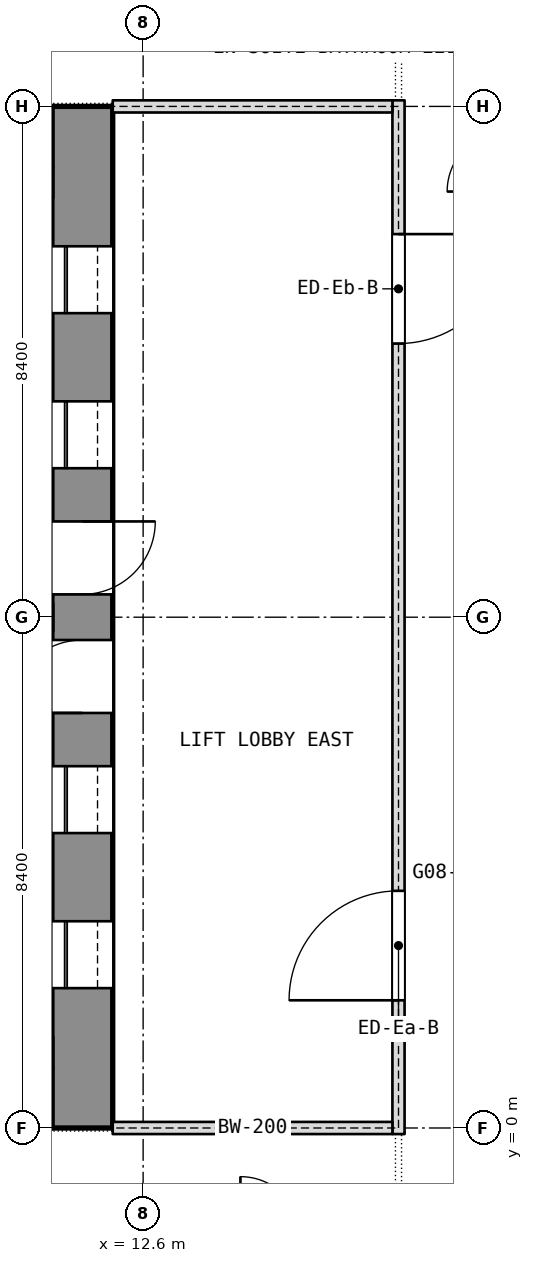
"""IFC4 building model, lengths in metres.
Left out: names, types, materials, properties, quantities, classifications, styles, units other than length and angle.
Written with IfcOpenShell. Run it as: python <this file> out.ifc"""

import sys

from ifc_helpers import new_model, si_unit, direction, frame, frame_2d, origin, place, context, subcontext, project, spatial, rectangle, extrude, element, fill, save


model = new_model("IFC4")
c1 = context("Model", 3, precision=1e-05, world=origin(), true_north=direction((0.0, 1.0)))
c2 = subcontext(c1, "Body", "Model", "MODEL_VIEW")
j1 = project(units=[si_unit("LENGTHUNIT", "METRE"), si_unit("PLANEANGLEUNIT", "RADIAN")], contexts=[c1])
p1 = place(None, origin())
s1 = spatial("IfcSite", under=j1, at=p1, CompositionType="ELEMENT")
p2 = place(p1, origin())
s2 = spatial("IfcBuilding", under=s1, at=p2, CompositionType="ELEMENT")
p3 = place(p2, frame((0.0, 0.0, 104.9)))
s3 = spatial("IfcBuildingStorey", under=s2, at=p3, CompositionType="ELEMENT", Elevation=104.9)
p4 = place(p3, frame((11.6, 0.0, 0.0), z_axis=(0.0, 0.0, 1.0), x_axis=(0.0, 1.0, 0.0)))
e1 = element("IfcWall", 1, at=p4, inside=s3, PredefinedType="SHEAR", context=c2, shape_type="SweptSolid", body=[
    extrude(rectangle(XDim=16.8, YDim=1.0, at=frame_2d((8.4, 0.0))), origin(), (0.0, 0.0, 1.0), 3.6),
])
p5 = place(p4, frame((2.3, 0.0, 0.0)))
e2 = element("IfcOpeningElement", 2, at=p5, cuts=e1, PredefinedType="OPENING", context=c2, shape_type="SweptSolid", body=[
    extrude(rectangle(XDim=1.1, YDim=2.1, at=frame_2d((0.55, 1.05))), frame((0.0, 0.5, 0.0), z_axis=(0.0, -1.0, 0.0), x_axis=(1.0, 0.0, 0.0)), (0.0, 0.0, 1.0), 1.0),
])
p6 = place(p4, frame((4.85, 0.0, 0.0)))
e3 = element("IfcOpeningElement", 3, at=p6, cuts=e1, PredefinedType="OPENING", context=c2, shape_type="SweptSolid", body=[
    extrude(rectangle(XDim=1.1, YDim=2.1, at=frame_2d((0.55, 1.05))), frame((0.0, 0.5, 0.0), z_axis=(0.0, -1.0, 0.0), x_axis=(1.0, 0.0, 0.0)), (0.0, 0.0, 1.0), 1.0),
])
p7 = place(p4, frame((6.825, 0.0, 0.0)))
e4 = element("IfcOpeningElement", 4, at=p7, cuts=e1, PredefinedType="OPENING", context=c2, shape_type="SweptSolid", body=[
    extrude(rectangle(XDim=1.2, YDim=2.1, at=frame_2d((0.6, 1.05))), frame((0.0, 0.5, 0.0), z_axis=(0.0, -1.0, 0.0), x_axis=(1.0, 0.0, 0.0)), (0.0, 0.0, 1.0), 1.0),
])
p8 = place(p4, frame((13.4, 0.0, 0.0)))
e5 = element("IfcOpeningElement", 5, at=p8, cuts=e1, PredefinedType="OPENING", context=c2, shape_type="SweptSolid", body=[
    extrude(rectangle(XDim=1.1, YDim=2.1, at=frame_2d((0.55, 1.05))), frame((0.0, 0.5, 0.0), z_axis=(0.0, -1.0, 0.0), x_axis=(1.0, 0.0, 0.0)), (0.0, 0.0, 1.0), 1.0),
])
p9 = place(p4, frame((10.85, 0.0, 0.0)))
e6 = element("IfcOpeningElement", 6, at=p9, cuts=e1, PredefinedType="OPENING", context=c2, shape_type="SweptSolid", body=[
    extrude(rectangle(XDim=1.1, YDim=2.1, at=frame_2d((0.55, 1.05))), frame((0.0, 0.5, 0.0), z_axis=(0.0, -1.0, 0.0), x_axis=(1.0, 0.0, 0.0)), (0.0, 0.0, 1.0), 1.0),
])
p10 = place(p4, frame((8.775, 0.0, 0.0)))
e7 = element("IfcOpeningElement", 7, at=p10, cuts=e1, PredefinedType="OPENING", context=c2, shape_type="SweptSolid", body=[
    extrude(rectangle(XDim=1.2, YDim=2.1, at=frame_2d((0.6, 1.05))), frame((0.0, 0.5, 0.0), z_axis=(0.0, -1.0, 0.0), x_axis=(1.0, 0.0, 0.0)), (0.0, 0.0, 1.0), 1.0),
])
p11 = place(p3, frame((16.8, -0.1, 0.0), z_axis=(0.0, 0.0, 1.0), x_axis=(0.0, 1.0, 0.0)))
e8 = element("IfcWall", 8, at=p11, inside=s3, PredefinedType="PARTITIONING", context=c2, shape_type="SweptSolid", body=[
    extrude(rectangle(XDim=17.0, YDim=0.2, at=frame_2d((8.5, 0.0))), origin(), (0.0, 0.0, 1.0), 3.34),
])
p12 = place(p11, frame((2.2, 0.0, 0.0)))
e9 = element("IfcOpeningElement", 9, at=p12, cuts=e8, PredefinedType="OPENING", context=c2, shape_type="SweptSolid", body=[
    extrude(rectangle(XDim=1.8, YDim=2.1, at=frame_2d((0.9, 1.05))), frame((0.0, 0.1, 0.0), z_axis=(0.0, -1.0, 0.0), x_axis=(1.0, 0.0, 0.0)), (0.0, 0.0, 1.0), 0.2),
])
p13 = place(p11, frame((13.0, 0.0, 0.0)))
e10 = element("IfcOpeningElement", 10, at=p13, cuts=e8, PredefinedType="OPENING", context=c2, shape_type="SweptSolid", body=[
    extrude(rectangle(XDim=1.8, YDim=2.1, at=frame_2d((0.9, 1.05))), frame((0.0, 0.1, 0.0), z_axis=(0.0, -1.0, 0.0), x_axis=(1.0, 0.0, 0.0)), (0.0, 0.0, 1.0), 0.2),
])
for number, where, z_axis, x_axis in (
    (11, (12.1, 0.0, 0.0), (0.0, 0.0, 1.0), (1.0, 0.0, 0.0)),
    (12, (12.1, 16.8, 0.0), (0.0, 0.0, 1.0), (1.0, 0.0, 0.0)),
):
    element("IfcWall", number, at=place(p3, frame(where, z_axis=z_axis, x_axis=x_axis)), inside=s3, PredefinedType="PARTITIONING", context=c2, shape_type="SweptSolid", body=[
        extrude(rectangle(XDim=4.6, YDim=0.2, at=frame_2d((2.3, 0.0))), origin(), (0.0, 0.0, 1.0), 2.89),
    ])
p14 = place(p5, origin())
e13 = element("IfcDoor", 13, at=p14, inside=s3, OperationType="SLIDING_TO_LEFT", PredefinedType="DOOR", context=c2, shape_type="SweptSolid", body=[
    extrude(rectangle(XDim=1.1, YDim=2.1, at=frame_2d((0.55, 1.05))), frame((0.0, 0.025, 0.0), z_axis=(0.0, -1.0, 0.0), x_axis=(1.0, 0.0, 0.0)), (0.0, 0.0, 1.0), 0.05),
])
fill(e2, e13)
p15 = place(p6, origin())
e14 = element("IfcDoor", 14, at=p15, inside=s3, OperationType="SLIDING_TO_LEFT", PredefinedType="DOOR", context=c2, shape_type="SweptSolid", body=[
    extrude(rectangle(XDim=1.1, YDim=2.1, at=frame_2d((0.55, 1.05))), frame((0.0, 0.025, 0.0), z_axis=(0.0, -1.0, 0.0), x_axis=(1.0, 0.0, 0.0)), (0.0, 0.0, 1.0), 0.05),
])
fill(e3, e14)
p16 = place(p7, origin())
e15 = element("IfcDoor", 15, at=p16, inside=s3, OperationType="SINGLE_SWING_LEFT", PredefinedType="DOOR", context=c2, shape_type="SweptSolid", body=[
    extrude(rectangle(XDim=1.2, YDim=2.1, at=frame_2d((0.6, 1.05))), frame((0.0, 0.025, 0.0), z_axis=(0.0, -1.0, 0.0), x_axis=(1.0, 0.0, 0.0)), (0.0, 0.0, 1.0), 0.05),
])
fill(e4, e15)
p17 = place(p8, origin())
e16 = element("IfcDoor", 16, at=p17, inside=s3, OperationType="SLIDING_TO_LEFT", PredefinedType="DOOR", context=c2, shape_type="SweptSolid", body=[
    extrude(rectangle(XDim=1.1, YDim=2.1, at=frame_2d((0.55, 1.05))), frame((0.0, 0.025, 0.0), z_axis=(0.0, -1.0, 0.0), x_axis=(1.0, 0.0, 0.0)), (0.0, 0.0, 1.0), 0.05),
])
fill(e5, e16)
p18 = place(p9, origin())
e17 = element("IfcDoor", 17, at=p18, inside=s3, OperationType="SLIDING_TO_LEFT", PredefinedType="DOOR", context=c2, shape_type="SweptSolid", body=[
    extrude(rectangle(XDim=1.1, YDim=2.1, at=frame_2d((0.55, 1.05))), frame((0.0, 0.025, 0.0), z_axis=(0.0, -1.0, 0.0), x_axis=(1.0, 0.0, 0.0)), (0.0, 0.0, 1.0), 0.05),
])
fill(e6, e17)
p19 = place(p10, origin())
e18 = element("IfcDoor", 18, at=p19, inside=s3, OperationType="SINGLE_SWING_LEFT", PredefinedType="DOOR", context=c2, shape_type="SweptSolid", body=[
    extrude(rectangle(XDim=1.2, YDim=2.1, at=frame_2d((0.6, 1.05))), frame((0.0, 0.025, 0.0), z_axis=(0.0, -1.0, 0.0), x_axis=(1.0, 0.0, 0.0)), (0.0, 0.0, 1.0), 0.05),
])
fill(e7, e18)
p20 = place(p12, origin())
e19 = element("IfcDoor", 19, at=p20, inside=s3, OperationType="DOUBLE_DOOR_SINGLE_SWING", PredefinedType="DOOR", context=c2, shape_type="SweptSolid", body=[
    extrude(rectangle(XDim=1.8, YDim=2.1, at=frame_2d((0.9, 1.05))), frame((0.0, 0.025, 0.0), z_axis=(0.0, -1.0, 0.0), x_axis=(1.0, 0.0, 0.0)), (0.0, 0.0, 1.0), 0.05),
])
fill(e9, e19)
p21 = place(p13, origin())
e20 = element("IfcDoor", 20, at=p21, inside=s3, OperationType="DOUBLE_DOOR_SINGLE_SWING", PredefinedType="DOOR", context=c2, shape_type="SweptSolid", body=[
    extrude(rectangle(XDim=1.8, YDim=2.1, at=frame_2d((0.9, 1.05))), frame((0.0, 0.025, 0.0), z_axis=(0.0, -1.0, 0.0), x_axis=(1.0, 0.0, 0.0)), (0.0, 0.0, 1.0), 0.05),
])
fill(e10, e20)
save(model, sys.argv[1])
